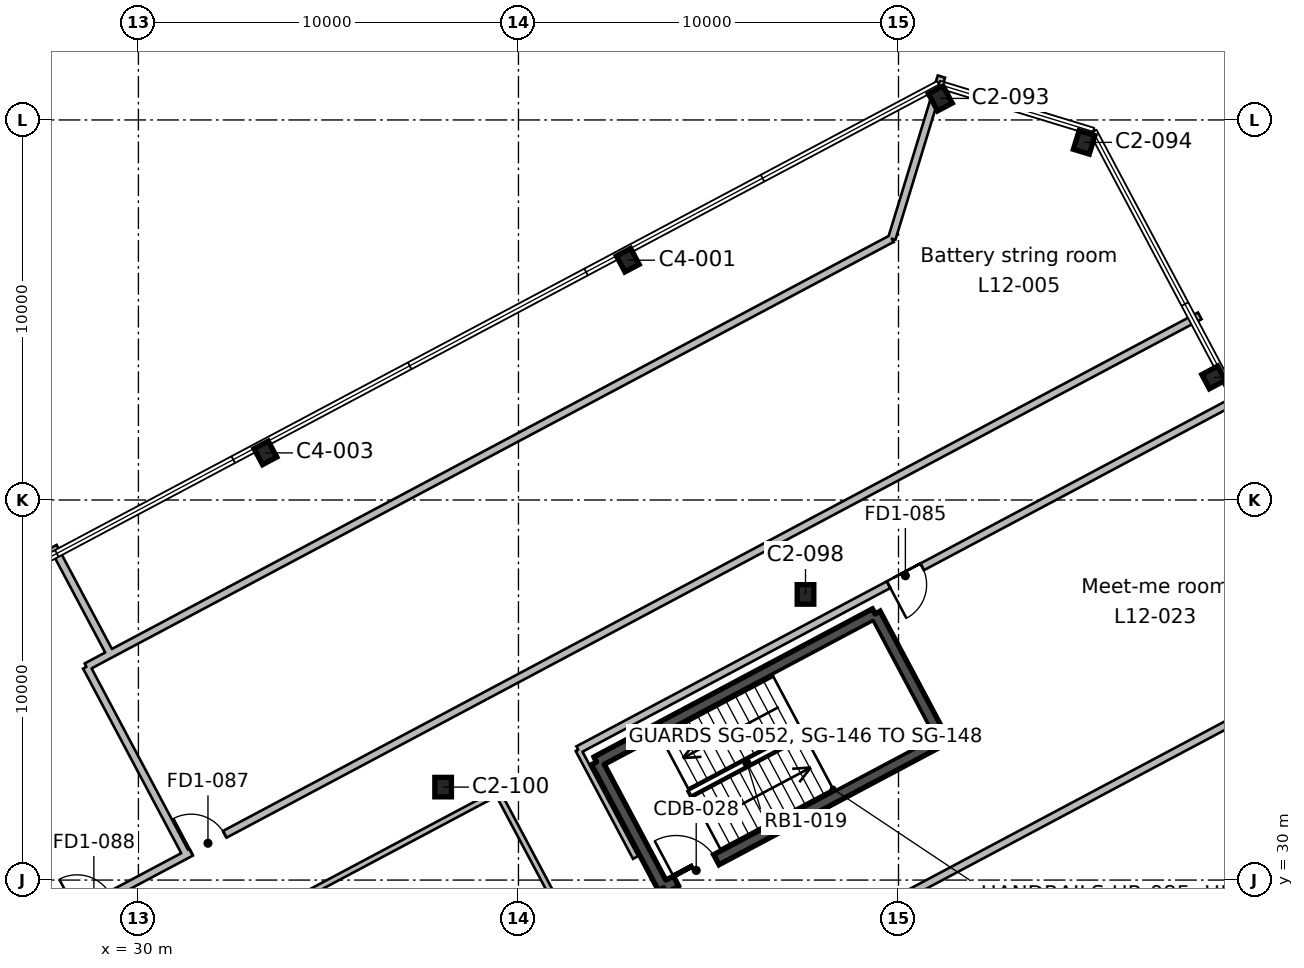
"""IFC4 building model, lengths in metres.
Left out: names, types, materials, properties, quantities, classifications, styles, units other than length and angle.
Written with IfcOpenShell. Run it as: python <this file> out.ifc"""

import sys

from ifc_helpers import new_model, si_unit, direction, frame, frame_2d, origin, origin_2d, place, context, subcontext, project, spatial, rectangle, i_section, extrude, element, fill, save


model = new_model("IFC4")
c1 = context("Model", 3, precision=1e-05, world=origin(), true_north=direction((0.0, 1.0)))
c2 = subcontext(c1, "Body", "Model", "MODEL_VIEW")
j1 = project(units=[si_unit("LENGTHUNIT", "METRE"), si_unit("PLANEANGLEUNIT", "RADIAN")], contexts=[c1])
p1 = place(None, origin())
s1 = spatial("IfcSite", under=j1, at=p1, CompositionType="ELEMENT")
p2 = place(p1, origin())
s2 = spatial("IfcBuilding", under=s1, at=p2, CompositionType="ELEMENT")
p3 = place(p2, frame((0.0, 0.0, 66.2)))
s3 = spatial("IfcBuildingStorey", under=s2, at=p3, CompositionType="ELEMENT", Elevation=66.2)
for number, where, z_axis, x_axis in (
    (1, (38.018, 32.446, 0.0), (0.0, 0.0, 1.0), (1.0, 0.0, 0.0)),
    (2, (47.553, 37.516, 0.0), (0.0, 0.0, 1.0), (1.0, 0.0, 0.0)),
):
    element("IfcColumn", number, at=place(p3, frame(where, z_axis=z_axis, x_axis=x_axis)), inside=s3, PredefinedType="COLUMN", context=c2, shape_type="SweptSolid", body=[
        extrude(i_section(OverallWidth=0.437, OverallDepth=0.513, WebThickness=0.061, FlangeThickness=0.097, FilletRadius=0.015, at=origin_2d()), origin(), (0.0, 0.0, 1.0), 4.6),
    ])
for number, where, z_axis, x_axis in (
    (3, (33.342, 41.24, 0.0), (0.0, 0.0, 1.0), (-0.883, -0.469, 0.0)),
    (4, (58.29, 43.225, 0.0), (0.0, 0.0, 1.0), (-0.469, 0.883, 0.0)),
    (5, (42.877, 46.31, 0.0), (0.0, 0.0, 1.0), (-0.883, -0.469, 0.0)),
):
    element("IfcColumn", number, at=place(p3, frame(where, z_axis=z_axis, x_axis=x_axis)), inside=s3, PredefinedType="COLUMN", context=c2, shape_type="SweptSolid", body=[
        extrude(i_section(OverallWidth=0.424, OverallDepth=0.475, WebThickness=0.048, FlangeThickness=0.077, FilletRadius=0.015, at=origin_2d()), origin(), (0.0, 0.0, 1.0), 4.6),
    ])
for number, where, z_axis, x_axis in (
    (6, (54.886, 49.41, 0.0), (0.0, 0.0, 1.0), (-0.956, 0.292, 0.0)),
    (7, (51.1, 50.567, 0.0), (0.0, 0.0, 1.0), (-0.883, -0.469, 0.0)),
):
    element("IfcColumn", number, at=place(p3, frame(where, z_axis=z_axis, x_axis=x_axis)), inside=s3, PredefinedType="COLUMN", context=c2, shape_type="SweptSolid", body=[
        extrude(i_section(OverallWidth=0.437, OverallDepth=0.513, WebThickness=0.061, FlangeThickness=0.097, FilletRadius=0.015, at=origin_2d()), origin(), (0.0, 0.0, 1.0), 4.6),
    ])
p4 = place(p3, frame((49.384, 37.004, 0.0), z_axis=(0.0, 0.0, 1.0), x_axis=(0.46946936446, -0.882948761726, 0.0)))
e8 = element("IfcWall", 8, at=p4, inside=s3, PredefinedType="SHEAR", context=c2, shape_type="SweptSolid", body=[
    extrude(rectangle(XDim=3.75, YDim=0.3, at=frame_2d((1.875, 0.0))), origin(), (0.0, 0.0, 1.0), 4.6),
])
p5 = place(p3, frame((51.145, 33.693, 0.0), z_axis=(0.0, 0.0, 1.0), x_axis=(-0.882945809314, -0.469474917132, 0.0)))
e9 = element("IfcWall", 9, at=p5, inside=s3, PredefinedType="SHEAR", context=c2, shape_type="SweptSolid", body=[
    extrude(rectangle(XDim=8.3, YDim=0.3, at=frame_2d((4.15, 0.0))), origin(), (0.0, 0.0, 1.0), 4.6),
])
p6 = place(p5, frame((6.725, 0.0, 0.0)))
e10 = element("IfcOpeningElement", 10, at=p6, cuts=e9, PredefinedType="OPENING", context=c2, shape_type="SweptSolid", body=[
    extrude(rectangle(XDim=1.2, YDim=2.1, at=frame_2d((0.6, 1.05))), frame((0.0, 0.16, 0.0), z_axis=(0.0, -1.0, 0.0), x_axis=(1.0, 0.0, 0.0)), (0.0, 0.0, 1.0), 0.32),
])
p7 = place(p3, frame((43.816, 29.796, 0.0), z_axis=(0.0, 0.0, 1.0), x_axis=(-0.46946936446, 0.882948761726, 0.0)))
e11 = element("IfcWall", 11, at=p7, inside=s3, PredefinedType="SHEAR", context=c2, shape_type="SweptSolid", body=[
    extrude(rectangle(XDim=3.75, YDim=0.3, at=frame_2d((1.875, 0.0))), origin(), (0.0, 0.0, 1.0), 4.6),
])
p8 = place(p3, frame((42.055, 33.107, 0.0), z_axis=(0.0, 0.0, 1.0), x_axis=(0.882945809314, 0.469474917132, 0.0)))
e12 = element("IfcWall", 12, at=p8, inside=s3, PredefinedType="SHEAR", context=c2, shape_type="SweptSolid", body=[
    extrude(rectangle(XDim=8.3, YDim=0.3, at=frame_2d((4.15, 0.0))), origin(), (0.0, 0.0, 1.0), 4.6),
])
p9 = place(p3, frame((0.0, 14.044, 0.0), z_axis=(0.0, 0.0, 1.0), x_axis=(0.882943219941, 0.469479786955, 0.0)))
e13 = element("IfcWall", 13, at=p9, inside=s3, PredefinedType="PARTITIONING", context=c2, shape_type="SweptSolid", body=[
    extrude(rectangle(XDim=65.607, YDim=0.2, at=frame_2d((32.803, 0.0))), origin(), (0.0, 0.0, 1.0), 4.2),
])
p10 = place(p9, frame((35.55, 0.0, 0.0)))
e14 = element("IfcOpeningElement", 14, at=p10, cuts=e13, PredefinedType="OPENING", context=c2, shape_type="SweptSolid", body=[
    extrude(rectangle(XDim=1.0, YDim=2.1, at=frame_2d((0.5, 1.05))), frame((0.0, 0.11, 0.0), z_axis=(0.0, -1.0, 0.0), x_axis=(1.0, 0.0, 0.0)), (0.0, 0.0, 1.0), 0.22),
])
p11 = place(p9, frame((32.15, 0.0, 0.0)))
e15 = element("IfcOpeningElement", 15, at=p11, cuts=e13, PredefinedType="OPENING", context=c2, shape_type="SweptSolid", body=[
    extrude(rectangle(XDim=1.0, YDim=2.1, at=frame_2d((0.5, 1.05))), frame((0.0, 0.11, 0.0), z_axis=(0.0, -1.0, 0.0), x_axis=(1.0, 0.0, 0.0)), (0.0, 0.0, 1.0), 0.22),
])
p12 = place(p9, frame((13.95, 0.0, 0.0)))
e16 = element("IfcOpeningElement", 16, at=p12, cuts=e13, PredefinedType="OPENING", context=c2, shape_type="SweptSolid", body=[
    extrude(rectangle(XDim=1.0, YDim=2.1, at=frame_2d((0.5, 1.05))), frame((0.0, 0.11, 0.0), z_axis=(0.0, -1.0, 0.0), x_axis=(1.0, 0.0, 0.0)), (0.0, 0.0, 1.0), 0.22),
])
p13 = place(p3, frame((30.249, 32.572, 0.0), z_axis=(0.0, 0.0, 1.0), x_axis=(0.469290296872, -0.883043949791, 0.0)))
e17 = element("IfcWall", 17, at=p13, inside=s3, PredefinedType="PARTITIONING", context=c2, shape_type="SweptSolid", body=[
    extrude(rectangle(XDim=2.158, YDim=0.2, at=frame_2d((1.079, 0.0))), origin(), (0.0, 0.0, 1.0), 4.2),
])
p14 = place(p3, frame((27.76, 38.771, 0.0), z_axis=(0.0, 0.0, 1.0), x_axis=(0.469320691295, -0.883027796121, 0.0)))
e18 = element("IfcWall", 18, at=p14, inside=s3, PredefinedType="PARTITIONING", context=c2, shape_type="SweptSolid", body=[
    extrude(rectangle(XDim=3.2, YDim=0.2, at=frame_2d((1.6, 0.0))), origin(), (0.0, 0.0, 1.0), 4.2),
])
p15 = place(p3, frame((29.26, 35.945, 0.0), z_axis=(0.0, 0.0, 1.0), x_axis=(0.882968820758, 0.469431636737, 0.0)))
e19 = element("IfcWall", 19, at=p15, inside=s3, PredefinedType="PARTITIONING", context=c2, shape_type="SweptSolid", body=[
    extrude(rectangle(XDim=23.29, YDim=0.2, at=frame_2d((11.645, 0.0))), origin(), (0.0, 0.0, 1.0), 4.2),
])
p16 = place(p3, frame((49.824, 46.878, 0.0), z_axis=(0.0, 0.0, 1.0), x_axis=(0.29242717897, 0.956287794024, 0.0)))
e20 = element("IfcWall", 20, at=p16, inside=s3, PredefinedType="PARTITIONING", context=c2, shape_type="SweptSolid", body=[
    extrude(rectangle(XDim=4.459, YDim=0.2, at=frame_2d((2.229, 0.0))), origin(), (0.0, 0.0, 1.0), 4.2),
])
p17 = place(p3, frame((30.249, 32.572, 0.0), z_axis=(0.0, 0.0, 1.0), x_axis=(-0.46948710086, 0.882939330943, 0.0)))
e21 = element("IfcWall", 21, at=p17, inside=s3, PredefinedType="PARTITIONING", context=c2, shape_type="SweptSolid", body=[
    extrude(rectangle(XDim=3.442, YDim=0.2, at=frame_2d((1.721, 0.0))), origin(), (0.0, 0.0, 1.0), 4.2),
])
p18 = place(p3, frame((28.633, 35.611, 0.0), z_axis=(0.0, 0.0, 1.0), x_axis=(0.882581167339, 0.470160061106, 0.0)))
e22 = element("IfcWall", 22, at=p18, inside=s3, PredefinedType="PARTITIONING", context=c2, shape_type="SweptSolid", body=[
    extrude(rectangle(XDim=0.71, YDim=0.2, at=frame_2d((0.355, 0.0))), origin(), (0.0, 0.0, 1.0), 4.2),
])
p19 = place(p3, frame((41.572, 33.43, 0.0), z_axis=(0.0, 0.0, 1.0), x_axis=(0.882950585831, 0.469465933781, 0.0)))
e23 = element("IfcWall", 23, at=p19, inside=s3, PredefinedType="PARTITIONING", context=c2, shape_type="SweptSolid", body=[
    extrude(rectangle(XDim=19.8, YDim=0.2, at=frame_2d((9.9, 0.0))), origin(), (0.0, 0.0, 1.0), 4.2),
])
p20 = place(p19, frame((9.25, 0.0, 0.0)))
e24 = element("IfcOpeningElement", 24, at=p20, cuts=e23, PredefinedType="OPENING", context=c2, shape_type="SweptSolid", body=[
    extrude(rectangle(XDim=1.0, YDim=2.1, at=frame_2d((0.5, 1.05))), frame((0.0, 0.11, 0.0), z_axis=(0.0, -1.0, 0.0), x_axis=(1.0, 0.0, 0.0)), (0.0, 0.0, 1.0), 0.22),
])
p21 = place(p3, frame((41.572, 33.43, 0.0), z_axis=(0.0, 0.0, 1.0), x_axis=(0.469510863882, -0.882926694974, 0.0)))
e25 = element("IfcWall", 25, at=p21, inside=s3, PredefinedType="PARTITIONING", context=c2, shape_type="SweptSolid", body=[
    extrude(rectangle(XDim=3.212, YDim=0.15, at=frame_2d((1.606, 0.0))), origin(), (0.0, 0.0, 1.0), 4.2),
])
p22 = place(p3, frame((62.542, 36.166, 0.0), z_axis=(0.0, 0.0, 1.0), x_axis=(-0.882962645452, -0.46944325188, 0.0)))
e26 = element("IfcWall", 26, at=p22, inside=s3, PredefinedType="PARTITIONING", context=c2, shape_type="SweptSolid", body=[
    extrude(rectangle(XDim=19.706, YDim=0.2, at=frame_2d((9.853, 0.0))), origin(), (0.0, 0.0, 1.0), 4.2),
])
p23 = place(p3, frame((30.623, 27.608, 0.0), z_axis=(0.0, 0.0, 1.0), x_axis=(0.882940863385, 0.469484218867, 0.0)))
e27 = element("IfcWall", 27, at=p23, inside=s3, PredefinedType="PARTITIONING", context=c2, shape_type="SweptSolid", body=[
    extrude(rectangle(XDim=10.0, YDim=0.15, at=frame_2d((5.0, 0.0))), origin(), (0.0, 0.0, 1.0), 4.2),
])
p24 = place(p3, frame((39.453, 32.303, 0.0), z_axis=(0.0, 0.0, 1.0), x_axis=(0.469461333319, -0.882953031887, 0.0)))
e28 = element("IfcWall", 28, at=p24, inside=s3, PredefinedType="PARTITIONING", context=c2, shape_type="SweptSolid", body=[
    extrude(rectangle(XDim=20.0, YDim=0.15, at=frame_2d((10.0, 0.0))), origin(), (0.0, 0.0, 1.0), 4.2),
])
p25 = place(p6, frame((1.2, 0.0, 0.0), z_axis=(0.0, 0.0, 1.0), x_axis=(-1.0, 0.0, 0.0)))
e29 = element("IfcDoor", 29, at=p25, inside=s3, OperationType="SINGLE_SWING_LEFT", PredefinedType="DOOR", context=c2, shape_type="SweptSolid", body=[
    extrude(rectangle(XDim=1.2, YDim=2.1, at=frame_2d((0.6, 1.05))), frame((0.0, 0.025, 0.0), z_axis=(0.0, -1.0, 0.0), x_axis=(1.0, 0.0, 0.0)), (0.0, 0.0, 1.0), 0.05),
])
fill(e10, e29)
p26 = place(p10, origin())
e30 = element("IfcDoor", 30, at=p26, inside=s3, OperationType="SINGLE_SWING_LEFT", PredefinedType="DOOR", context=c2, shape_type="SweptSolid", body=[
    extrude(rectangle(XDim=1.0, YDim=2.1, at=frame_2d((0.5, 1.05))), frame((0.0, 0.025, 0.0), z_axis=(0.0, -1.0, 0.0), x_axis=(1.0, 0.0, 0.0)), (0.0, 0.0, 1.0), 0.05),
])
fill(e14, e30)
p27 = place(p20, frame((1.0, 0.0, 0.0), z_axis=(0.0, 0.0, 1.0), x_axis=(-1.0, 0.0, 0.0)))
e31 = element("IfcDoor", 31, at=p27, inside=s3, OperationType="SINGLE_SWING_RIGHT", PredefinedType="DOOR", context=c2, shape_type="SweptSolid", body=[
    extrude(rectangle(XDim=1.0, YDim=2.1, at=frame_2d((0.5, 1.05))), frame((0.0, 0.025, 0.0), z_axis=(0.0, -1.0, 0.0), x_axis=(1.0, 0.0, 0.0)), (0.0, 0.0, 1.0), 0.05),
])
fill(e24, e31)
save(model, sys.argv[1])
